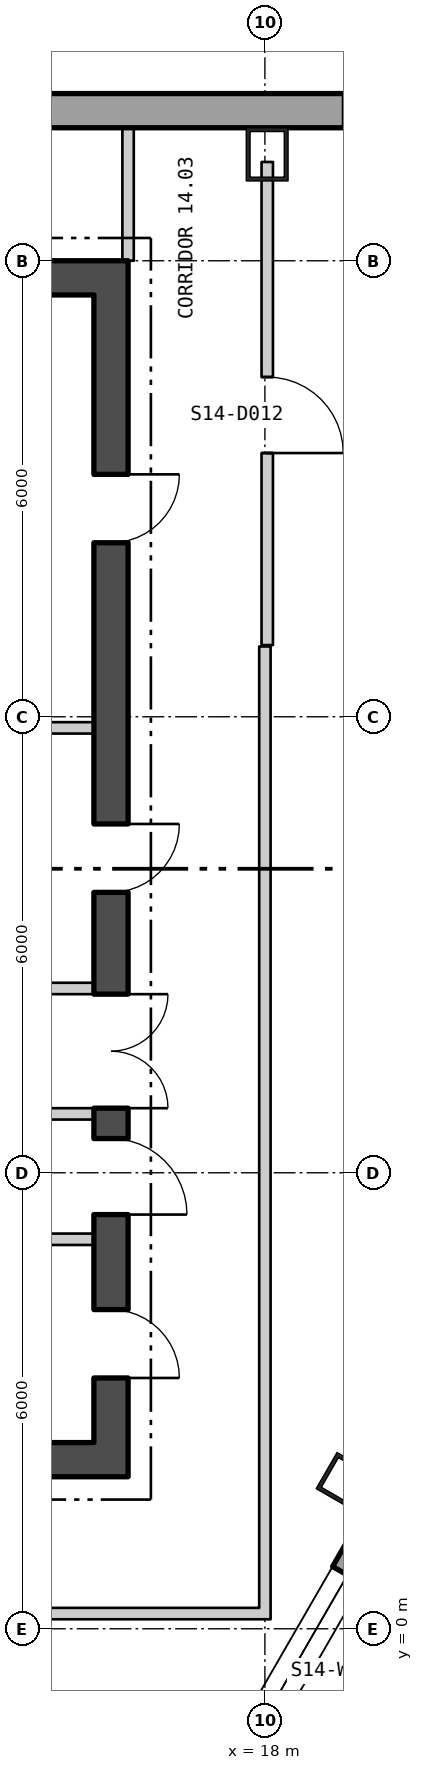
"""IFC4 building model, lengths in metres.
Left out: names, types, materials, properties, quantities, classifications, styles, units other than length and angle.
Written with IfcOpenShell. Run it as: python <this file> out.ifc"""

import sys

from ifc_helpers import new_model, si_unit, direction, frame, frame_2d, origin, origin_2d, place, context, subcontext, project, spatial, polyline, rectangle, hollow_rectangle, outline, extrude, element, fill, save


model = new_model("IFC4")
c1 = context("Model", 3, precision=1e-05, world=origin(), true_north=direction((0.0, 1.0)))
c2 = subcontext(c1, "Body", "Model", "MODEL_VIEW")
j1 = project(units=[si_unit("LENGTHUNIT", "METRE"), si_unit("PLANEANGLEUNIT", "RADIAN")], contexts=[c1])
p1 = place(None, origin())
s1 = spatial("IfcSite", under=j1, at=p1, CompositionType="ELEMENT")
p2 = place(p1, origin())
s2 = spatial("IfcBuilding", under=s1, at=p2, CompositionType="ELEMENT")
p3 = place(p2, frame((0.0, 0.0, 192.6)))
s3 = spatial("IfcBuildingStorey", under=s2, at=p3, CompositionType="ELEMENT", Elevation=192.6)
for number, where, z_axis, x_axis in (
    (1, (18.03, 19.4, 0.0), (0.0, 0.0, 1.0), (-1.0, 0.0, 0.0)),
    (2, (19.115, 1.907, 0.0), (0.0, 0.0, 1.0), (0.5, 0.866, 0.0)),
):
    element("IfcColumn", number, at=place(p3, frame(where, z_axis=z_axis, x_axis=x_axis)), inside=s3, PredefinedType="COLUMN", context=c2, shape_type="SweptSolid", body=[
        extrude(hollow_rectangle(XDim=0.55, YDim=0.7, WallThickness=0.05, at=origin_2d()), origin(), (0.0, 0.0, 1.0), 3.9),
    ])
p4 = place(p3, frame((22.87, 19.975, -0.4), z_axis=(0.0, 0.0, 1.0), x_axis=(-1.0, 0.0, 0.0)))
e3 = element("IfcWall", 3, at=p4, inside=s3, PredefinedType="SOLIDWALL", context=c2, shape_type="SweptSolid", body=[
    extrude(outline(polyline([(-0.13, -0.225), (45.87, -0.225), (45.61, 0.225), (0.13, 0.225), (-0.13, -0.225)])), origin(), (0.0, 0.0, 1.0), 3.9),
])
p5 = place(p4, frame((1.424, 0.0, 1.3)))
e4 = element("IfcOpeningElement", 4, at=p5, cuts=e3, PredefinedType="OPENING", context=c2, shape_type="SweptSolid", body=[
    extrude(rectangle(XDim=2.4, YDim=2.0, at=frame_2d((1.2, 1.0))), frame((0.0, 0.235, 0.0), z_axis=(0.0, -1.0, 0.0), x_axis=(1.0, 0.0, 0.0)), (0.0, 0.0, 1.0), 0.47),
])
p6 = place(p4, frame((10.401, 0.0, 1.3)))
e5 = element("IfcOpeningElement", 5, at=p6, cuts=e3, PredefinedType="OPENING", context=c2, shape_type="SweptSolid", body=[
    extrude(rectangle(XDim=2.4, YDim=2.0, at=frame_2d((1.2, 1.0))), frame((0.0, 0.235, 0.0), z_axis=(0.0, -1.0, 0.0), x_axis=(1.0, 0.0, 0.0)), (0.0, 0.0, 1.0), 0.47),
])
p7 = place(p4, frame((14.909, 0.0, 1.3)))
e6 = element("IfcOpeningElement", 6, at=p7, cuts=e3, PredefinedType="OPENING", context=c2, shape_type="SweptSolid", body=[
    extrude(rectangle(XDim=2.4, YDim=2.0, at=frame_2d((1.2, 1.0))), frame((0.0, 0.235, 0.0), z_axis=(0.0, -1.0, 0.0), x_axis=(1.0, 0.0, 0.0)), (0.0, 0.0, 1.0), 0.47),
])
p8 = place(p4, frame((19.416, 0.0, 1.3)))
e7 = element("IfcOpeningElement", 7, at=p8, cuts=e3, PredefinedType="OPENING", context=c2, shape_type="SweptSolid", body=[
    extrude(rectangle(XDim=2.4, YDim=2.0, at=frame_2d((1.2, 1.0))), frame((0.0, 0.235, 0.0), z_axis=(0.0, -1.0, 0.0), x_axis=(1.0, 0.0, 0.0)), (0.0, 0.0, 1.0), 0.47),
])
p9 = place(p4, frame((23.924, 0.0, 1.3)))
e8 = element("IfcOpeningElement", 8, at=p9, cuts=e3, PredefinedType="OPENING", context=c2, shape_type="SweptSolid", body=[
    extrude(rectangle(XDim=2.4, YDim=2.0, at=frame_2d((1.2, 1.0))), frame((0.0, 0.235, 0.0), z_axis=(0.0, -1.0, 0.0), x_axis=(1.0, 0.0, 0.0)), (0.0, 0.0, 1.0), 0.47),
])
p10 = place(p4, frame((28.431, 0.0, 1.3)))
e9 = element("IfcOpeningElement", 9, at=p10, cuts=e3, PredefinedType="OPENING", context=c2, shape_type="SweptSolid", body=[
    extrude(rectangle(XDim=2.4, YDim=2.0, at=frame_2d((1.2, 1.0))), frame((0.0, 0.235, 0.0), z_axis=(0.0, -1.0, 0.0), x_axis=(1.0, 0.0, 0.0)), (0.0, 0.0, 1.0), 0.47),
])
p11 = place(p4, frame((32.939, 0.0, 1.3)))
e10 = element("IfcOpeningElement", 10, at=p11, cuts=e3, PredefinedType="OPENING", context=c2, shape_type="SweptSolid", body=[
    extrude(rectangle(XDim=2.4, YDim=2.0, at=frame_2d((1.2, 1.0))), frame((0.0, 0.235, 0.0), z_axis=(0.0, -1.0, 0.0), x_axis=(1.0, 0.0, 0.0)), (0.0, 0.0, 1.0), 0.47),
])
p12 = place(p4, frame((37.447, 0.0, 1.3)))
e11 = element("IfcOpeningElement", 11, at=p12, cuts=e3, PredefinedType="OPENING", context=c2, shape_type="SweptSolid", body=[
    extrude(rectangle(XDim=2.4, YDim=2.0, at=frame_2d((1.2, 1.0))), frame((0.0, 0.235, 0.0), z_axis=(0.0, -1.0, 0.0), x_axis=(1.0, 0.0, 0.0)), (0.0, 0.0, 1.0), 0.47),
])
p13 = place(p4, frame((41.916, 0.0, 1.3)))
e12 = element("IfcOpeningElement", 12, at=p13, cuts=e3, PredefinedType="OPENING", context=c2, shape_type="SweptSolid", body=[
    extrude(rectangle(XDim=2.4, YDim=2.0, at=frame_2d((1.2, 1.0))), frame((0.0, 0.235, 0.0), z_axis=(0.0, -1.0, 0.0), x_axis=(1.0, 0.0, 0.0)), (0.0, 0.0, 1.0), 0.47),
])
p14 = place(p3, frame((3.67, -25.994, -0.18), z_axis=(0.0, 0.0, 1.0), x_axis=(0.499999764979, 0.866025539474, 0.0)))
e13 = element("IfcWall", 13, at=p14, inside=s3, PredefinedType="SOLIDWALL", context=c2, shape_type="SweptSolid", body=[
    extrude(outline(polyline([(-0.13, -0.225), (45.87, -0.225), (45.61, 0.225), (0.13, 0.225), (-0.13, -0.225)])), origin(), (0.0, 0.0, 1.0), 3.68),
])
p15 = place(p14, frame((1.424, 0.0, 1.08)))
e14 = element("IfcOpeningElement", 14, at=p15, cuts=e13, PredefinedType="OPENING", context=c2, shape_type="SweptSolid", body=[
    extrude(rectangle(XDim=2.4, YDim=2.0, at=frame_2d((1.2, 1.0))), frame((0.0, 0.235, 0.0), z_axis=(0.0, -1.0, 0.0), x_axis=(1.0, 0.0, 0.0)), (0.0, 0.0, 1.0), 0.47),
])
p16 = place(p14, frame((5.893, 0.0, 1.08)))
e15 = element("IfcOpeningElement", 15, at=p16, cuts=e13, PredefinedType="OPENING", context=c2, shape_type="SweptSolid", body=[
    extrude(rectangle(XDim=2.4, YDim=2.0, at=frame_2d((1.2, 1.0))), frame((0.0, 0.235, 0.0), z_axis=(0.0, -1.0, 0.0), x_axis=(1.0, 0.0, 0.0)), (0.0, 0.0, 1.0), 0.47),
])
p17 = place(p14, frame((10.401, 0.0, 1.08)))
e16 = element("IfcOpeningElement", 16, at=p17, cuts=e13, PredefinedType="OPENING", context=c2, shape_type="SweptSolid", body=[
    extrude(rectangle(XDim=2.4, YDim=2.0, at=frame_2d((1.2, 1.0))), frame((0.0, 0.235, 0.0), z_axis=(0.0, -1.0, 0.0), x_axis=(1.0, 0.0, 0.0)), (0.0, 0.0, 1.0), 0.47),
])
p18 = place(p14, frame((14.909, 0.0, 1.08)))
e17 = element("IfcOpeningElement", 17, at=p18, cuts=e13, PredefinedType="OPENING", context=c2, shape_type="SweptSolid", body=[
    extrude(rectangle(XDim=2.4, YDim=2.0, at=frame_2d((1.2, 1.0))), frame((0.0, 0.235, 0.0), z_axis=(0.0, -1.0, 0.0), x_axis=(1.0, 0.0, 0.0)), (0.0, 0.0, 1.0), 0.47),
])
p19 = place(p14, frame((19.416, 0.0, 1.08)))
e18 = element("IfcOpeningElement", 18, at=p19, cuts=e13, PredefinedType="OPENING", context=c2, shape_type="SweptSolid", body=[
    extrude(rectangle(XDim=2.4, YDim=2.0, at=frame_2d((1.2, 1.0))), frame((0.0, 0.235, 0.0), z_axis=(0.0, -1.0, 0.0), x_axis=(1.0, 0.0, 0.0)), (0.0, 0.0, 1.0), 0.47),
])
p20 = place(p14, frame((23.924, 0.0, 1.08)))
e19 = element("IfcOpeningElement", 19, at=p20, cuts=e13, PredefinedType="OPENING", context=c2, shape_type="SweptSolid", body=[
    extrude(rectangle(XDim=2.4, YDim=2.0, at=frame_2d((1.2, 1.0))), frame((0.0, 0.235, 0.0), z_axis=(0.0, -1.0, 0.0), x_axis=(1.0, 0.0, 0.0)), (0.0, 0.0, 1.0), 0.47),
])
p21 = place(p14, frame((28.431, 0.0, 1.08)))
e20 = element("IfcOpeningElement", 20, at=p21, cuts=e13, PredefinedType="OPENING", context=c2, shape_type="SweptSolid", body=[
    extrude(rectangle(XDim=2.4, YDim=2.0, at=frame_2d((1.2, 1.0))), frame((0.0, 0.235, 0.0), z_axis=(0.0, -1.0, 0.0), x_axis=(1.0, 0.0, 0.0)), (0.0, 0.0, 1.0), 0.47),
])
p22 = place(p14, frame((32.939, 0.0, 1.08)))
e21 = element("IfcOpeningElement", 21, at=p22, cuts=e13, PredefinedType="OPENING", context=c2, shape_type="SweptSolid", body=[
    extrude(rectangle(XDim=2.4, YDim=2.0, at=frame_2d((1.2, 1.0))), frame((0.0, 0.235, 0.0), z_axis=(0.0, -1.0, 0.0), x_axis=(1.0, 0.0, 0.0)), (0.0, 0.0, 1.0), 0.47),
])
p23 = place(p14, frame((37.447, 0.0, 1.08)))
e22 = element("IfcOpeningElement", 22, at=p23, cuts=e13, PredefinedType="OPENING", context=c2, shape_type="SweptSolid", body=[
    extrude(rectangle(XDim=2.4, YDim=2.0, at=frame_2d((1.2, 1.0))), frame((0.0, 0.235, 0.0), z_axis=(0.0, -1.0, 0.0), x_axis=(1.0, 0.0, 0.0)), (0.0, 0.0, 1.0), 0.47),
])
p24 = place(p14, frame((41.916, 0.0, 1.08)))
e23 = element("IfcOpeningElement", 23, at=p24, cuts=e13, PredefinedType="OPENING", context=c2, shape_type="SweptSolid", body=[
    extrude(rectangle(XDim=2.4, YDim=2.0, at=frame_2d((1.2, 1.0))), frame((0.0, 0.235, 0.0), z_axis=(0.0, -1.0, 0.0), x_axis=(1.0, 0.0, 0.0)), (0.0, 0.0, 1.0), 0.47),
])
p25 = place(p3, frame((-16.2, 2.225, 0.0), z_axis=(0.0, 0.0, 1.0), x_axis=(1.0, 0.0, 0.0)))
e24 = element("IfcWall", 24, at=p25, inside=s3, PredefinedType="SHEAR", context=c2, shape_type="SweptSolid", body=[
    extrude(rectangle(XDim=32.4, YDim=0.45, at=frame_2d((16.2, 0.0))), origin(), (0.0, 0.0, 1.0), 3.7),
])
p26 = place(p25, frame((10.7, 0.0, 0.0)))
e25 = element("IfcOpeningElement", 25, at=p26, cuts=e24, PredefinedType="OPENING", context=c2, shape_type="SweptSolid", body=[
    extrude(rectangle(XDim=1.8, YDim=2.4, at=frame_2d((0.9, 1.2))), frame((0.0, 0.235, 0.0), z_axis=(0.0, -1.0, 0.0), x_axis=(1.0, 0.0, 0.0)), (0.0, 0.0, 1.0), 0.47),
])
p27 = place(p25, frame((20.7, 0.0, 0.0)))
e26 = element("IfcOpeningElement", 26, at=p27, cuts=e24, PredefinedType="OPENING", context=c2, shape_type="SweptSolid", body=[
    extrude(rectangle(XDim=1.8, YDim=2.4, at=frame_2d((0.9, 1.2))), frame((0.0, 0.235, 0.0), z_axis=(0.0, -1.0, 0.0), x_axis=(1.0, 0.0, 0.0)), (0.0, 0.0, 1.0), 0.47),
])
p28 = place(p3, frame((-16.2, 17.775, 0.0), z_axis=(0.0, 0.0, 1.0), x_axis=(1.0, 0.0, 0.0)))
e27 = element("IfcWall", 27, at=p28, inside=s3, PredefinedType="SHEAR", context=c2, shape_type="SweptSolid", body=[
    extrude(rectangle(XDim=32.4, YDim=0.45, at=frame_2d((16.2, 0.0))), origin(), (0.0, 0.0, 1.0), 3.7),
])
p29 = place(p3, frame((15.975, 2.45, 0.0), z_axis=(0.0, 0.0, 1.0), x_axis=(0.0, 1.0, 0.0)))
e28 = element("IfcWall", 28, at=p29, inside=s3, PredefinedType="SHEAR", context=c2, shape_type="SweptSolid", body=[
    extrude(rectangle(XDim=15.1, YDim=0.45, at=frame_2d((7.55, 0.0))), origin(), (0.0, 0.0, 1.0), 3.7),
])
p30 = place(p29, frame((4.4, 0.0, 0.0)))
e29 = element("IfcOpeningElement", 29, at=p30, cuts=e28, PredefinedType="OPENING", context=c2, shape_type="SweptSolid", body=[
    extrude(rectangle(XDim=1.5, YDim=2.1, at=frame_2d((0.75, 1.05))), frame((0.0, 0.235, 0.0), z_axis=(0.0, -1.0, 0.0), x_axis=(1.0, 0.0, 0.0)), (0.0, 0.0, 1.0), 0.47),
])
p31 = place(p29, frame((0.85, 0.0, 0.0)))
e30 = element("IfcOpeningElement", 30, at=p31, cuts=e28, PredefinedType="OPENING", context=c2, shape_type="SweptSolid", body=[
    extrude(rectangle(XDim=0.9, YDim=2.1, at=frame_2d((0.45, 1.05))), frame((0.0, 0.235, 0.0), z_axis=(0.0, -1.0, 0.0), x_axis=(1.0, 0.0, 0.0)), (0.0, 0.0, 1.0), 0.47),
])
p32 = place(p29, frame((3.0, 0.0, 0.0)))
e31 = element("IfcOpeningElement", 31, at=p32, cuts=e28, PredefinedType="OPENING", context=c2, shape_type="SweptSolid", body=[
    extrude(rectangle(XDim=1.0, YDim=2.1, at=frame_2d((0.5, 1.05))), frame((0.0, 0.235, 0.0), z_axis=(0.0, -1.0, 0.0), x_axis=(1.0, 0.0, 0.0)), (0.0, 0.0, 1.0), 0.47),
])
p33 = place(p29, frame((7.239, 0.0, 0.0)))
e32 = element("IfcOpeningElement", 32, at=p33, cuts=e28, PredefinedType="OPENING", context=c2, shape_type="SweptSolid", body=[
    extrude(rectangle(XDim=0.9, YDim=2.1, at=frame_2d((0.45, 1.05))), frame((0.0, 0.235, 0.0), z_axis=(0.0, -1.0, 0.0), x_axis=(1.0, 0.0, 0.0)), (0.0, 0.0, 1.0), 0.47),
])
p34 = place(p29, frame((11.839, 0.0, 0.0)))
e33 = element("IfcOpeningElement", 33, at=p34, cuts=e28, PredefinedType="OPENING", context=c2, shape_type="SweptSolid", body=[
    extrude(rectangle(XDim=0.9, YDim=2.1, at=frame_2d((0.45, 1.05))), frame((0.0, 0.235, 0.0), z_axis=(0.0, -1.0, 0.0), x_axis=(1.0, 0.0, 0.0)), (0.0, 0.0, 1.0), 0.47),
])
for number, where, z_axis, x_axis in (
    (34, (14.5, 6.775, 0.0), (0.0, 0.0, 1.0), (1.0, 0.0, 0.0)),
    (35, (14.5, 8.425, 0.0), (0.0, 0.0, 1.0), (1.0, 0.0, 0.0)),
    (36, (14.5, 5.125, 0.0), (0.0, 0.0, 1.0), (1.0, 0.0, 0.0)),
    (37, (14.5, 11.854, 0.0), (0.0, 0.0, 1.0), (1.0, 0.0, 0.0)),
):
    element("IfcWall", number, at=place(p3, frame(where, z_axis=z_axis, x_axis=x_axis)), inside=s3, PredefinedType="PARTITIONING", context=c2, shape_type="SweptSolid", body=[
        extrude(rectangle(XDim=1.25, YDim=0.15, at=frame_2d((0.625, 0.0))), origin(), (0.0, 0.0, 1.0), 3.7),
    ])
p35 = place(p3, frame((6.9, 0.2, 0.0), z_axis=(0.0, 0.0, 1.0), x_axis=(1.0, 0.0, 0.0)))
e38 = element("IfcWall", 38, at=p35, inside=s3, PredefinedType="PARTITIONING", context=c2, shape_type="SweptSolid", body=[
    extrude(rectangle(XDim=11.025, YDim=0.15, at=frame_2d((5.513, 0.0))), origin(), (0.0, 0.0, 1.0), 3.7),
])
p36 = place(p3, frame((16.2, 18.0, 0.0), z_axis=(0.0, 0.0, 1.0), x_axis=(0.0, 1.0, 0.0)))
e39 = element("IfcWall", 39, at=p36, inside=s3, PredefinedType="PARTITIONING", context=c2, shape_type="SweptSolid", body=[
    extrude(rectangle(XDim=1.75, YDim=0.15, at=frame_2d((0.875, 0.0))), origin(), (0.0, 0.0, 1.0), 3.7),
])
p37 = place(p3, frame((18.0, 0.125, 0.0), z_axis=(0.0, 0.0, 1.0), x_axis=(0.0, 1.0, 0.0)))
e40 = element("IfcWall", 40, at=p37, inside=s3, PredefinedType="PARTITIONING", context=c2, shape_type="SweptSolid", body=[
    extrude(rectangle(XDim=12.8, YDim=0.15, at=frame_2d((6.4, 0.0))), origin(), (0.0, 0.0, 1.0), 3.7),
])
p38 = place(p3, frame((18.031, 12.943, 0.0), z_axis=(0.0, 0.0, 1.0), x_axis=(0.0, 1.0, 0.0)))
e41 = element("IfcWall", 41, at=p38, inside=s3, PredefinedType="PARTITIONING", context=c2, shape_type="SweptSolid", body=[
    extrude(rectangle(XDim=6.357, YDim=0.15, at=frame_2d((3.179, 0.0))), origin(), (0.0, 0.0, 1.0), 3.7),
])
p39 = place(p38, frame((2.527, 0.0, 0.0)))
e42 = element("IfcOpeningElement", 42, at=p39, cuts=e41, PredefinedType="OPENING", context=c2, shape_type="SweptSolid", body=[
    extrude(rectangle(XDim=1.0, YDim=2.1, at=frame_2d((0.5, 1.05))), frame((0.0, 0.085, 0.0), z_axis=(0.0, -1.0, 0.0), x_axis=(1.0, 0.0, 0.0)), (0.0, 0.0, 1.0), 0.17),
])
p40 = place(p21, origin())
e43 = element("IfcWindow", 43, at=p40, inside=s3, PartitioningType="SINGLE_PANEL", PredefinedType="WINDOW", context=c2, shape_type="SweptSolid", body=[
    extrude(rectangle(XDim=2.4, YDim=2.0, at=frame_2d((1.2, 1.0))), frame((0.0, 0.105, 0.0), z_axis=(0.0, -1.0, 0.0), x_axis=(1.0, 0.0, 0.0)), (0.0, 0.0, 1.0), 0.06),
])
fill(e20, e43)
p41 = place(p30, origin())
e44 = element("IfcDoor", 44, at=p41, inside=s3, OperationType="DOUBLE_DOOR_SINGLE_SWING", PredefinedType="DOOR", context=c2, shape_type="SweptSolid", body=[
    extrude(rectangle(XDim=1.5, YDim=2.1, at=frame_2d((0.75, 1.05))), frame((0.0, 0.025, 0.0), z_axis=(0.0, -1.0, 0.0), x_axis=(1.0, 0.0, 0.0)), (0.0, 0.0, 1.0), 0.05),
])
fill(e29, e44)
p42 = place(p31, origin())
e45 = element("IfcDoor", 45, at=p42, inside=s3, OperationType="SINGLE_SWING_LEFT", PredefinedType="DOOR", context=c2, shape_type="SweptSolid", body=[
    extrude(rectangle(XDim=0.9, YDim=2.1, at=frame_2d((0.45, 1.05))), frame((0.0, 0.025, 0.0), z_axis=(0.0, -1.0, 0.0), x_axis=(1.0, 0.0, 0.0)), (0.0, 0.0, 1.0), 0.05),
])
fill(e30, e45)
p43 = place(p32, origin())
e46 = element("IfcDoor", 46, at=p43, inside=s3, OperationType="SINGLE_SWING_LEFT", PredefinedType="DOOR", context=c2, shape_type="SweptSolid", body=[
    extrude(rectangle(XDim=1.0, YDim=2.1, at=frame_2d((0.5, 1.05))), frame((0.0, 0.025, 0.0), z_axis=(0.0, -1.0, 0.0), x_axis=(1.0, 0.0, 0.0)), (0.0, 0.0, 1.0), 0.05),
])
fill(e31, e46)
p44 = place(p33, origin())
e47 = element("IfcDoor", 47, at=p44, inside=s3, OperationType="SINGLE_SWING_RIGHT", PredefinedType="DOOR", context=c2, shape_type="SweptSolid", body=[
    extrude(rectangle(XDim=0.9, YDim=2.1, at=frame_2d((0.45, 1.05))), frame((0.0, 0.025, 0.0), z_axis=(0.0, -1.0, 0.0), x_axis=(1.0, 0.0, 0.0)), (0.0, 0.0, 1.0), 0.05),
])
fill(e32, e47)
p45 = place(p34, origin())
e48 = element("IfcDoor", 48, at=p45, inside=s3, OperationType="SINGLE_SWING_RIGHT", PredefinedType="DOOR", context=c2, shape_type="SweptSolid", body=[
    extrude(rectangle(XDim=0.9, YDim=2.1, at=frame_2d((0.45, 1.05))), frame((0.0, 0.025, 0.0), z_axis=(0.0, -1.0, 0.0), x_axis=(1.0, 0.0, 0.0)), (0.0, 0.0, 1.0), 0.05),
])
fill(e33, e48)
p46 = place(p39, origin())
e49 = element("IfcDoor", 49, at=p46, inside=s3, OperationType="SINGLE_SWING_LEFT", PredefinedType="DOOR", context=c2, shape_type="SweptSolid", body=[
    extrude(rectangle(XDim=1.0, YDim=2.1, at=frame_2d((0.5, 1.05))), frame((0.0, 0.025, 0.0), z_axis=(0.0, -1.0, 0.0), x_axis=(1.0, 0.0, 0.0)), (0.0, 0.0, 1.0), 0.05),
])
fill(e42, e49)
save(model, sys.argv[1])
